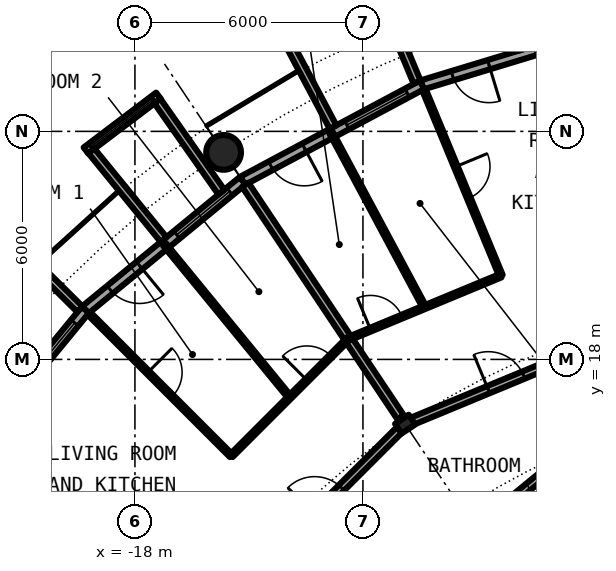
"""IFC4 building model, lengths in metres.
Left out: names, types, materials, properties, quantities, classifications, styles, units other than length and angle.
Written with IfcOpenShell. Run it as: python <this file> out.ifc"""

import sys

from ifc_helpers import new_model, si_unit, direction, frame, frame_2d, origin, origin_2d, place, context, subcontext, project, spatial, rectangle, circle, hollow_circle, i_section, extrude, element, fill, save


model = new_model("IFC4")
c1 = context("Model", 3, precision=1e-05, world=origin(), true_north=direction((0.0, 1.0)))
c2 = subcontext(c1, "Body", "Model", "MODEL_VIEW")
j1 = project(units=[si_unit("LENGTHUNIT", "METRE"), si_unit("PLANEANGLEUNIT", "RADIAN")], contexts=[c1])
p1 = place(None, origin())
s1 = spatial("IfcSite", under=j1, at=p1, CompositionType="ELEMENT")
p2 = place(p1, origin())
s2 = spatial("IfcBuilding", under=s1, at=p2, CompositionType="ELEMENT")
p3 = place(p2, frame((0.0, 0.0, 111.65)))
s3 = spatial("IfcBuildingStorey", under=s2, at=p3, CompositionType="ELEMENT", Elevation=111.65)
p4 = place(p3, frame((-15.667, 23.448, 0.0), z_axis=(0.0, 0.0, 1.0), x_axis=(1.0, 0.0, 0.0)))
e1 = element("IfcColumn", 1, at=p4, inside=s3, PredefinedType="COLUMN", context=c2, shape_type="SweptSolid", body=[
    extrude(hollow_circle(Radius=0.457, WallThickness=0.04, at=origin_2d()), origin(), (0.0, 0.0, 1.0), 3.05),
])
p5 = place(p3, frame((-10.889, 16.297, 0.0), z_axis=(0.0, 0.0, 1.0), x_axis=(-0.55557023302, 0.831469612303, 0.0)))
e2 = element("IfcColumn", 2, at=p5, inside=s3, PredefinedType="COLUMN", context=c2, shape_type="SweptSolid", body=[
    extrude(i_section(OverallWidth=0.307, OverallDepth=0.432, WebThickness=0.021, FlangeThickness=0.04, FilletRadius=0.027, at=origin_2d()), origin(), (0.0, 0.0, 1.0), 3.05),
])
p6 = place(p3, frame((-5.326, 26.775, 0.0), z_axis=(0.0, 0.0, 1.0), x_axis=(-0.956965678721, -0.290201119486, 0.0)))
e3 = element("IfcWall", 3, at=p6, inside=s3, PredefinedType="SOLIDWALL", context=c2, shape_type="SweptSolid", body=[
    extrude(rectangle(XDim=5.351, YDim=0.25, at=frame_2d((2.676, 0.0))), origin(), (0.0, 0.0, 1.0), 2.7),
])
p7 = place(p6, frame((0.441, 0.0, 0.3)))
e4 = element("IfcOpeningElement", 4, at=p7, cuts=e3, PredefinedType="OPENING", context=c2, shape_type="SweptSolid", body=[
    extrude(rectangle(XDim=1.8, YDim=2.1, at=frame_2d((0.9, 1.05))), frame((0.0, 0.135, 0.0), z_axis=(0.0, -1.0, 0.0), x_axis=(1.0, 0.0, 0.0)), (0.0, 0.0, 1.0), 0.27),
])
p8 = place(p6, frame((3.51, 0.0, 0.0)))
e5 = element("IfcOpeningElement", 5, at=p8, cuts=e3, PredefinedType="OPENING", context=c2, shape_type="SweptSolid", body=[
    extrude(rectangle(XDim=1.0, YDim=2.2, at=frame_2d((0.5, 1.1))), frame((0.0, 0.135, 0.0), z_axis=(0.0, -1.0, 0.0), x_axis=(1.0, 0.0, 0.0)), (0.0, 0.0, 1.0), 0.27),
])
p9 = place(p3, frame((-10.447, 25.222, 0.0), z_axis=(0.0, 0.0, 1.0), x_axis=(-0.881915646801, -0.471407246368, 0.0)))
e6 = element("IfcWall", 6, at=p9, inside=s3, PredefinedType="SOLIDWALL", context=c2, shape_type="SweptSolid", body=[
    extrude(rectangle(XDim=5.352, YDim=0.25, at=frame_2d((2.676, 0.0))), origin(), (0.0, 0.0, 1.0), 2.7),
])
p10 = place(p9, frame((0.441, 0.0, 0.3)))
e7 = element("IfcOpeningElement", 7, at=p10, cuts=e6, PredefinedType="OPENING", context=c2, shape_type="SweptSolid", body=[
    extrude(rectangle(XDim=1.8, YDim=2.1, at=frame_2d((0.9, 1.05))), frame((0.0, 0.135, 0.0), z_axis=(0.0, -1.0, 0.0), x_axis=(1.0, 0.0, 0.0)), (0.0, 0.0, 1.0), 0.27),
])
p11 = place(p9, frame((3.51, 0.0, 0.0)))
e8 = element("IfcOpeningElement", 8, at=p11, cuts=e6, PredefinedType="OPENING", context=c2, shape_type="SweptSolid", body=[
    extrude(rectangle(XDim=1.0, YDim=2.2, at=frame_2d((0.5, 1.1))), frame((0.0, 0.135, 0.0), z_axis=(0.0, -1.0, 0.0), x_axis=(1.0, 0.0, 0.0)), (0.0, 0.0, 1.0), 0.27),
])
p12 = place(p3, frame((-10.575, 25.295, -0.03), z_axis=(0.0, 0.0, 1.0), x_axis=(-0.385697364644, 0.922625353492, 0.0)))
e9 = element("IfcWall", 9, at=p12, inside=s3, PredefinedType="SOLIDWALL", context=c2, shape_type="SweptSolid", body=[
    extrude(rectangle(XDim=2.883, YDim=0.2, at=frame_2d((1.442, 0.0))), origin(), (0.0, 0.0, 1.0), 2.73),
])
p13 = place(p3, frame((-12.787, 24.113, -0.03), z_axis=(0.0, 0.0, 1.0), x_axis=(-0.468365282436, 0.883534924159, 0.0)))
e10 = element("IfcWall", 10, at=p13, inside=s3, PredefinedType="SOLIDWALL", context=c2, shape_type="SweptSolid", body=[
    extrude(rectangle(XDim=3.006, YDim=0.2, at=frame_2d((1.503, 0.0))), origin(), (0.0, 0.0, 1.0), 2.73),
])
p14 = place(p3, frame((-15.167, 22.699, 0.0), z_axis=(0.0, 0.0, 1.0), x_axis=(-0.773019449054, -0.634382322723, 0.0)))
e11 = element("IfcWall", 11, at=p14, inside=s3, PredefinedType="SOLIDWALL", context=c2, shape_type="SweptSolid", body=[
    extrude(rectangle(XDim=5.352, YDim=0.25, at=frame_2d((2.676, 0.0))), origin(), (0.0, 0.0, 1.0), 2.7),
])
p15 = place(p14, frame((0.441, 0.0, 0.3)))
e12 = element("IfcOpeningElement", 12, at=p15, cuts=e11, PredefinedType="OPENING", context=c2, shape_type="SweptSolid", body=[
    extrude(rectangle(XDim=1.8, YDim=2.1, at=frame_2d((0.9, 1.05))), frame((0.0, 0.135, 0.0), z_axis=(0.0, -1.0, 0.0), x_axis=(1.0, 0.0, 0.0)), (0.0, 0.0, 1.0), 0.27),
])
p16 = place(p14, frame((3.51, 0.0, 0.0)))
e13 = element("IfcOpeningElement", 13, at=p16, cuts=e11, PredefinedType="OPENING", context=c2, shape_type="SweptSolid", body=[
    extrude(rectangle(XDim=1.0, YDim=2.2, at=frame_2d((0.5, 1.1))), frame((0.0, 0.135, 0.0), z_axis=(0.0, -1.0, 0.0), x_axis=(1.0, 0.0, 0.0)), (0.0, 0.0, 1.0), 0.27),
])
p17 = place(p3, frame((-17.382, 24.94, -0.03), z_axis=(0.0, 0.0, 1.0), x_axis=(-0.797456837111, -0.603375996329, 0.0)))
e14 = element("IfcWall", 14, at=p17, inside=s3, PredefinedType="SOLIDWALL", context=c2, shape_type="SweptSolid", body=[
    extrude(rectangle(XDim=2.391, YDim=0.2, at=frame_2d((1.196, 0.0))), origin(), (0.0, 0.0, 1.0), 2.73),
])
p18 = place(p17, frame((0.156, 0.0, 0.33)))
e15 = element("IfcOpeningElement", 15, at=p18, cuts=e14, PredefinedType="OPENING", context=c2, shape_type="SweptSolid", body=[
    extrude(circle(Radius=1.04, at=frame_2d((1.04, 1.04))), frame((0.0, 0.11, 0.0), z_axis=(0.0, -1.0, 0.0), x_axis=(1.0, 0.0, 0.0)), (0.0, 0.0, 1.0), 0.22),
])
p19 = place(p3, frame((-15.726, 22.402, -0.03), z_axis=(0.0, 0.0, 1.0), x_axis=(-0.574826383135, 0.818275399393, 0.0)))
e16 = element("IfcWall", 16, at=p19, inside=s3, PredefinedType="SOLIDWALL", context=c2, shape_type="SweptSolid", body=[
    extrude(rectangle(XDim=2.929, YDim=0.2, at=frame_2d((1.465, 0.0))), origin(), (0.0, 0.0, 1.0), 2.73),
])
p20 = place(p3, frame((-17.246, 21.155, -0.03), z_axis=(0.0, 0.0, 1.0), x_axis=(-0.631741648902, 0.775179004516, 0.0)))
e17 = element("IfcWall", 17, at=p20, inside=s3, PredefinedType="SOLIDWALL", context=c2, shape_type="SweptSolid", body=[
    extrude(rectangle(XDim=3.006, YDim=0.2, at=frame_2d((1.503, 0.0))), origin(), (0.0, 0.0, 1.0), 2.73),
])
p21 = place(p3, frame((-19.304, 19.304, 0.0), z_axis=(0.0, 0.0, 1.0), x_axis=(-0.634382322723, -0.773019449054, 0.0)))
e18 = element("IfcWall", 18, at=p21, inside=s3, PredefinedType="SOLIDWALL", context=c2, shape_type="SweptSolid", body=[
    extrude(rectangle(XDim=5.352, YDim=0.25, at=frame_2d((2.676, 0.0))), origin(), (0.0, 0.0, 1.0), 2.7),
])
p22 = place(p21, frame((0.441, 0.0, 0.3)))
e19 = element("IfcOpeningElement", 19, at=p22, cuts=e18, PredefinedType="OPENING", context=c2, shape_type="SweptSolid", body=[
    extrude(rectangle(XDim=1.8, YDim=2.1, at=frame_2d((0.9, 1.05))), frame((0.0, 0.135, 0.0), z_axis=(0.0, -1.0, 0.0), x_axis=(1.0, 0.0, 0.0)), (0.0, 0.0, 1.0), 0.27),
])
p23 = place(p21, frame((3.51, 0.0, 0.0)))
e20 = element("IfcOpeningElement", 20, at=p23, cuts=e18, PredefinedType="OPENING", context=c2, shape_type="SweptSolid", body=[
    extrude(rectangle(XDim=1.0, YDim=2.2, at=frame_2d((0.5, 1.1))), frame((0.0, 0.135, 0.0), z_axis=(0.0, -1.0, 0.0), x_axis=(1.0, 0.0, 0.0)), (0.0, 0.0, 1.0), 0.27),
])
p24 = place(p3, frame((-19.45, 19.323, -0.03), z_axis=(0.0, 0.0, 1.0), x_axis=(-0.709727076896, 0.704476739375, 0.0)))
e21 = element("IfcWall", 21, at=p24, inside=s3, PredefinedType="SOLIDWALL", context=c2, shape_type="SweptSolid", body=[
    extrude(rectangle(XDim=2.883, YDim=0.2, at=frame_2d((1.441, 0.0))), origin(), (0.0, 0.0, 1.0), 2.73),
])
p25 = place(p3, frame((-22.595, 15.098, 0.0), z_axis=(0.0, 0.0, 1.0), x_axis=(0.831406593008, -0.555664536482, 0.0)))
e22 = element("IfcWall", 22, at=p25, inside=s3, PredefinedType="PARTITIONING", context=c2, shape_type="SweptSolid", body=[
    extrude(rectangle(XDim=7.358, YDim=0.2, at=frame_2d((3.679, 0.0))), origin(), (0.0, 0.0, 1.0), 2.7),
])
p26 = place(p3, frame((-19.216, 19.216, 0.0), z_axis=(0.0, 0.0, 1.0), x_axis=(0.707106781187, -0.707106781187, 0.0)))
e23 = element("IfcWall", 23, at=p26, inside=s3, PredefinedType="PARTITIONING", context=c2, shape_type="SweptSolid", body=[
    extrude(rectangle(XDim=5.305, YDim=0.1, at=frame_2d((2.652, 0.0))), origin(), (0.0, 0.0, 1.0), 2.7),
])
p27 = place(p26, frame((2.202, 0.0, 0.0)))
e24 = element("IfcOpeningElement", 24, at=p27, cuts=e23, PredefinedType="OPENING", context=c2, shape_type="SweptSolid", body=[
    extrude(rectangle(XDim=0.9, YDim=2.3, at=frame_2d((0.45, 1.15))), frame((0.0, 0.06, 0.0), z_axis=(0.0, -1.0, 0.0), x_axis=(1.0, 0.0, 0.0)), (0.0, 0.0, 1.0), 0.12),
])
p28 = place(p3, frame((-17.22, 21.023, 0.0), z_axis=(0.0, 0.0, 1.0), x_axis=(0.633774976367, -0.773517471898, 0.0)))
e25 = element("IfcWall", 25, at=p28, inside=s3, PredefinedType="PARTITIONING", context=c2, shape_type="SweptSolid", body=[
    extrude(rectangle(XDim=5.196, YDim=0.1, at=frame_2d((2.598, 0.0))), origin(), (0.0, 0.0, 1.0), 2.7),
])
p29 = place(p3, frame((-15.097, 22.595, 0.0), z_axis=(0.0, 0.0, 1.0), x_axis=(0.555572791, -0.831467903109, 0.0)))
e26 = element("IfcWall", 26, at=p29, inside=s3, PredefinedType="PARTITIONING", context=c2, shape_type="SweptSolid", body=[
    extrude(rectangle(XDim=7.358, YDim=0.2, at=frame_2d((3.679, 0.0))), origin(), (0.0, 0.0, 1.0), 2.7),
])
p30 = place(p3, frame((-12.833, 23.954, 0.0), z_axis=(0.0, 0.0, 1.0), x_axis=(0.472148388886, -0.881519085938, 0.0)))
e27 = element("IfcWall", 27, at=p30, inside=s3, PredefinedType="PARTITIONING", context=c2, shape_type="SweptSolid", body=[
    extrude(rectangle(XDim=5.196, YDim=0.1, at=frame_2d((2.598, 0.0))), origin(), (0.0, 0.0, 1.0), 2.7),
])
p31 = place(p3, frame((-10.399, 25.106, 0.0), z_axis=(0.0, 0.0, 1.0), x_axis=(0.382620183578, -0.92390572848, 0.0)))
e28 = element("IfcWall", 28, at=p31, inside=s3, PredefinedType="PARTITIONING", context=c2, shape_type="SweptSolid", body=[
    extrude(rectangle(XDim=5.302, YDim=0.1, at=frame_2d((2.651, 0.0))), origin(), (0.0, 0.0, 1.0), 2.7),
])
p32 = place(p31, frame((2.201, 0.0, 0.0)))
e29 = element("IfcOpeningElement", 29, at=p32, cuts=e28, PredefinedType="OPENING", context=c2, shape_type="SweptSolid", body=[
    extrude(rectangle(XDim=0.9, YDim=2.3, at=frame_2d((0.45, 1.15))), frame((0.0, 0.06, 0.0), z_axis=(0.0, -1.0, 0.0), x_axis=(1.0, 0.0, 0.0)), (0.0, 0.0, 1.0), 0.12),
])
p33 = place(p3, frame((-14.052, 9.389, 0.0), z_axis=(0.0, 0.0, 1.0), x_axis=(0.77292501819, 0.634497372931, 0.0)))
e30 = element("IfcWall", 30, at=p33, inside=s3, PredefinedType="PARTITIONING", context=c2, shape_type="SweptSolid", body=[
    extrude(rectangle(XDim=9.81, YDim=0.2, at=frame_2d((4.905, 0.0))), origin(), (0.0, 0.0, 1.0), 2.7),
])
p34 = place(p33, frame((4.406, 0.0, 0.0)))
e31 = element("IfcOpeningElement", 31, at=p34, cuts=e30, PredefinedType="OPENING", context=c2, shape_type="SweptSolid", body=[
    extrude(rectangle(XDim=1.0, YDim=2.3, at=frame_2d((0.5, 1.15))), frame((0.0, 0.11, 0.0), z_axis=(0.0, -1.0, 0.0), x_axis=(1.0, 0.0, 0.0)), (0.0, 0.0, 1.0), 0.22),
])
p35 = place(p3, frame((-16.186, 11.0, 0.0), z_axis=(0.0, 0.0, 1.0), x_axis=(0.707106781187, 0.707106781187, 0.0)))
e32 = element("IfcWall", 32, at=p35, inside=s3, PredefinedType="PARTITIONING", context=c2, shape_type="SweptSolid", body=[
    extrude(rectangle(XDim=7.334, YDim=0.2, at=frame_2d((3.667, 0.0))), origin(), (0.0, 0.0, 1.0), 2.39),
])
p36 = place(p35, frame((4.123, 0.0, 0.0)))
e33 = element("IfcOpeningElement", 33, at=p36, cuts=e32, PredefinedType="OPENING", context=c2, shape_type="SweptSolid", body=[
    extrude(rectangle(XDim=1.0, YDim=2.3, at=frame_2d((0.5, 1.15))), frame((0.0, 0.11, 0.0), z_axis=(0.0, -1.0, 0.0), x_axis=(1.0, 0.0, 0.0)), (0.0, 0.0, 1.0), 0.22),
])
p37 = place(p3, frame((-10.745, 16.357, 0.0), z_axis=(0.0, 0.0, 1.0), x_axis=(0.923928411035, 0.382565407848, 0.0)))
e34 = element("IfcWall", 34, at=p37, inside=s3, PredefinedType="PARTITIONING", context=c2, shape_type="SweptSolid", body=[
    extrude(rectangle(XDim=7.335, YDim=0.2, at=frame_2d((3.667, 0.0))), origin(), (0.0, 0.0, 1.0), 2.39),
])
p38 = place(p37, frame((2.212, 0.0, 0.0)))
e35 = element("IfcOpeningElement", 35, at=p38, cuts=e34, PredefinedType="OPENING", context=c2, shape_type="SweptSolid", body=[
    extrude(rectangle(XDim=1.0, YDim=2.3, at=frame_2d((0.5, 1.15))), frame((0.0, 0.11, 0.0), z_axis=(0.0, -1.0, 0.0), x_axis=(1.0, 0.0, 0.0)), (0.0, 0.0, 1.0), 0.22),
])
p39 = place(p3, frame((-15.465, 15.465, 0.0), z_axis=(0.0, 0.0, 1.0), x_axis=(0.707022606819, 0.707190945535, 0.0)))
e36 = element("IfcWall", 36, at=p39, inside=s3, PredefinedType="PARTITIONING", context=c2, shape_type="SweptSolid", body=[
    extrude(rectangle(XDim=4.351, YDim=0.1, at=frame_2d((2.175, 0.0))), origin(), (0.0, 0.0, 1.0), 2.7),
])
p40 = place(p39, frame((2.813, 0.0, 0.0)))
e37 = element("IfcOpeningElement", 37, at=p40, cuts=e36, PredefinedType="OPENING", context=c2, shape_type="SweptSolid", body=[
    extrude(rectangle(XDim=0.9, YDim=2.3, at=frame_2d((0.45, 1.15))), frame((0.0, 0.06, 0.0), z_axis=(0.0, -1.0, 0.0), x_axis=(1.0, 0.0, 0.0)), (0.0, 0.0, 1.0), 0.12),
])
p41 = place(p3, frame((-12.397, 18.536, 0.0), z_axis=(0.0, 0.0, 1.0), x_axis=(0.923761942059, 0.382967197554, 0.0)))
e38 = element("IfcWall", 38, at=p41, inside=s3, PredefinedType="PARTITIONING", context=c2, shape_type="SweptSolid", body=[
    extrude(rectangle(XDim=4.356, YDim=0.1, at=frame_2d((2.178, 0.0))), origin(), (0.0, 0.0, 1.0), 2.7),
])
p42 = place(p41, frame((0.646, 0.0, 0.0)))
e39 = element("IfcOpeningElement", 39, at=p42, cuts=e38, PredefinedType="OPENING", context=c2, shape_type="SweptSolid", body=[
    extrude(rectangle(XDim=0.9, YDim=2.3, at=frame_2d((0.45, 1.15))), frame((0.0, 0.06, 0.0), z_axis=(0.0, -1.0, 0.0), x_axis=(1.0, 0.0, 0.0)), (0.0, 0.0, 1.0), 0.12),
])
p43 = place(p8, origin())
e40 = element("IfcDoor", 40, at=p43, inside=s3, OperationType="SINGLE_SWING_LEFT", PredefinedType="DOOR", context=c2, shape_type="SweptSolid", body=[
    extrude(rectangle(XDim=1.0, YDim=2.2, at=frame_2d((0.5, 1.1))), frame((0.0, 0.025, 0.0), z_axis=(0.0, -1.0, 0.0), x_axis=(1.0, 0.0, 0.0)), (0.0, 0.0, 1.0), 0.05),
])
fill(e5, e40)
p44 = place(p10, origin())
e41 = element("IfcWindow", 41, at=p44, inside=s3, PartitioningType="SINGLE_PANEL", PredefinedType="WINDOW", context=c2, shape_type="SweptSolid", body=[
    extrude(rectangle(XDim=1.8, YDim=2.1, at=frame_2d((0.9, 1.05))), frame((0.0, 0.03, 0.0), z_axis=(0.0, -1.0, 0.0), x_axis=(1.0, 0.0, 0.0)), (0.0, 0.0, 1.0), 0.06),
])
fill(e7, e41)
p45 = place(p11, origin())
e42 = element("IfcDoor", 42, at=p45, inside=s3, OperationType="SINGLE_SWING_LEFT", PredefinedType="DOOR", context=c2, shape_type="SweptSolid", body=[
    extrude(rectangle(XDim=1.0, YDim=2.2, at=frame_2d((0.5, 1.1))), frame((0.0, 0.025, 0.0), z_axis=(0.0, -1.0, 0.0), x_axis=(1.0, 0.0, 0.0)), (0.0, 0.0, 1.0), 0.05),
])
fill(e8, e42)
p46 = place(p15, origin())
e43 = element("IfcWindow", 43, at=p46, inside=s3, PartitioningType="SINGLE_PANEL", PredefinedType="WINDOW", context=c2, shape_type="SweptSolid", body=[
    extrude(rectangle(XDim=1.8, YDim=2.1, at=frame_2d((0.9, 1.05))), frame((0.0, 0.03, 0.0), z_axis=(0.0, -1.0, 0.0), x_axis=(1.0, 0.0, 0.0)), (0.0, 0.0, 1.0), 0.06),
])
fill(e12, e43)
p47 = place(p18, origin())
e44 = element("IfcWindow", 44, at=p47, inside=s3, PartitioningType="SINGLE_PANEL", PredefinedType="WINDOW", context=c2, shape_type="SweptSolid", body=[
    extrude(circle(Radius=1.04, at=frame_2d((1.04, 1.04))), frame((0.0, 0.03, 0.0), z_axis=(0.0, -1.0, 0.0), x_axis=(1.0, 0.0, 0.0)), (0.0, 0.0, 1.0), 0.06),
])
fill(e15, e44)
p48 = place(p16, origin())
e45 = element("IfcDoor", 45, at=p48, inside=s3, OperationType="SINGLE_SWING_LEFT", PredefinedType="DOOR", context=c2, shape_type="SweptSolid", body=[
    extrude(rectangle(XDim=1.0, YDim=2.2, at=frame_2d((0.5, 1.1))), frame((0.0, 0.025, 0.0), z_axis=(0.0, -1.0, 0.0), x_axis=(1.0, 0.0, 0.0)), (0.0, 0.0, 1.0), 0.05),
])
fill(e13, e45)
p49 = place(p22, origin())
e46 = element("IfcWindow", 46, at=p49, inside=s3, PartitioningType="SINGLE_PANEL", PredefinedType="WINDOW", context=c2, shape_type="SweptSolid", body=[
    extrude(rectangle(XDim=1.8, YDim=2.1, at=frame_2d((0.9, 1.05))), frame((0.0, 0.03, 0.0), z_axis=(0.0, -1.0, 0.0), x_axis=(1.0, 0.0, 0.0)), (0.0, 0.0, 1.0), 0.06),
])
fill(e19, e46)
p50 = place(p38, origin())
e47 = element("IfcDoor", 47, at=p50, inside=s3, OperationType="SINGLE_SWING_LEFT", PredefinedType="DOOR", context=c2, shape_type="SweptSolid", body=[
    extrude(rectangle(XDim=1.0, YDim=2.3, at=frame_2d((0.5, 1.15))), frame((0.0, 0.025, 0.0), z_axis=(0.0, -1.0, 0.0), x_axis=(1.0, 0.0, 0.0)), (0.0, 0.0, 1.0), 0.05),
])
fill(e35, e47)
p51 = place(p32, origin())
e48 = element("IfcDoor", 48, at=p51, inside=s3, OperationType="SINGLE_SWING_LEFT", PredefinedType="DOOR", context=c2, shape_type="SweptSolid", body=[
    extrude(rectangle(XDim=0.9, YDim=2.3, at=frame_2d((0.45, 1.15))), frame((0.0, 0.025, 0.0), z_axis=(0.0, -1.0, 0.0), x_axis=(1.0, 0.0, 0.0)), (0.0, 0.0, 1.0), 0.05),
])
fill(e29, e48)
p52 = place(p42, origin())
e49 = element("IfcDoor", 49, at=p52, inside=s3, OperationType="SINGLE_SWING_LEFT", PredefinedType="DOOR", context=c2, shape_type="SweptSolid", body=[
    extrude(rectangle(XDim=0.9, YDim=2.3, at=frame_2d((0.45, 1.15))), frame((0.0, 0.025, 0.0), z_axis=(0.0, -1.0, 0.0), x_axis=(1.0, 0.0, 0.0)), (0.0, 0.0, 1.0), 0.05),
])
fill(e39, e49)
p53 = place(p36, origin())
e50 = element("IfcDoor", 50, at=p53, inside=s3, OperationType="SINGLE_SWING_RIGHT", PredefinedType="DOOR", context=c2, shape_type="SweptSolid", body=[
    extrude(rectangle(XDim=1.0, YDim=2.3, at=frame_2d((0.5, 1.15))), frame((0.0, 0.025, 0.0), z_axis=(0.0, -1.0, 0.0), x_axis=(1.0, 0.0, 0.0)), (0.0, 0.0, 1.0), 0.05),
])
fill(e33, e50)
p54 = place(p27, origin())
e51 = element("IfcDoor", 51, at=p54, inside=s3, OperationType="SINGLE_SWING_LEFT", PredefinedType="DOOR", context=c2, shape_type="SweptSolid", body=[
    extrude(rectangle(XDim=0.9, YDim=2.3, at=frame_2d((0.45, 1.15))), frame((0.0, 0.025, 0.0), z_axis=(0.0, -1.0, 0.0), x_axis=(1.0, 0.0, 0.0)), (0.0, 0.0, 1.0), 0.05),
])
fill(e24, e51)
p55 = place(p40, origin())
e52 = element("IfcDoor", 52, at=p55, inside=s3, OperationType="SINGLE_SWING_RIGHT", PredefinedType="DOOR", context=c2, shape_type="SweptSolid", body=[
    extrude(rectangle(XDim=0.9, YDim=2.3, at=frame_2d((0.45, 1.15))), frame((0.0, 0.025, 0.0), z_axis=(0.0, -1.0, 0.0), x_axis=(1.0, 0.0, 0.0)), (0.0, 0.0, 1.0), 0.05),
])
fill(e37, e52)
save(model, sys.argv[1])
